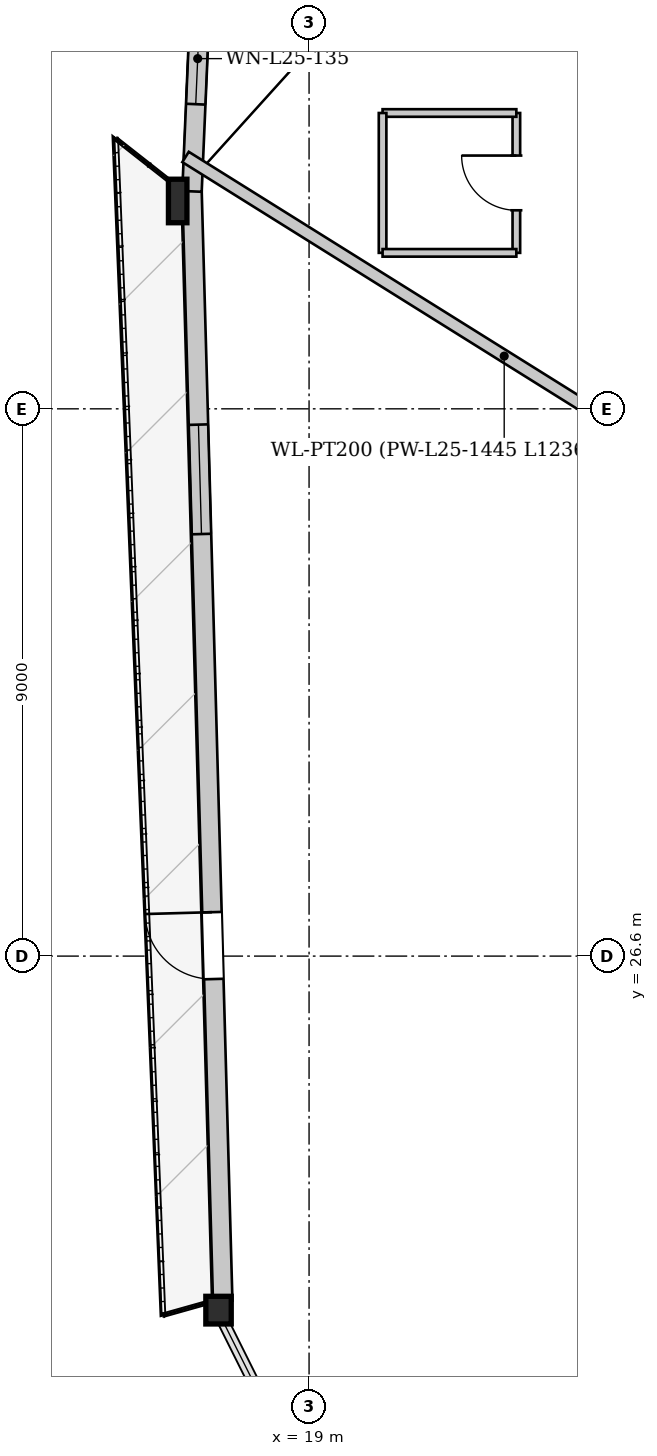
"""IFC4 building model, lengths in metres.
Left out: names, types, materials, properties, quantities, classifications, styles, units other than length and angle.
Written with IfcOpenShell. Run it as: python <this file> out.ifc"""

import sys

from ifc_helpers import new_model, si_unit, direction, frame, frame_2d, origin, origin_2d, place, context, subcontext, project, spatial, rectangle, i_section, extrude, source, transform, mapped, element, fill, save


model = new_model("IFC4")
c1 = context("Model", 3, precision=1e-05, world=origin(), true_north=direction((0.0, 1.0)))
c2 = subcontext(c1, "Body", "Model", "MODEL_VIEW")
j1 = project(units=[si_unit("LENGTHUNIT", "METRE"), si_unit("PLANEANGLEUNIT", "RADIAN")], contexts=[c1])
p1 = place(None, origin())
s1 = spatial("IfcSite", under=j1, at=p1, CompositionType="ELEMENT")
p2 = place(p1, origin())
s2 = spatial("IfcBuilding", under=s1, at=p2, CompositionType="ELEMENT")
p3 = place(p2, frame((0.0, 0.0, 98.6)))
s3 = spatial("IfcBuildingStorey", under=s2, at=p3, CompositionType="ELEMENT", Elevation=98.6)
m1 = source(origin(), c2, "Body", "SweptSolid", [
    extrude(i_section(OverallWidth=0.304, OverallDepth=0.716, WebThickness=0.021, FlangeThickness=0.04, at=origin_2d()), origin(), (0.0, 0.0, 1.0), 3.404),
])
p4 = place(p3, frame((16.914, 39.183, 0.0), z_axis=(-0.044103945942, -0.096956967339, 0.994310911354), x_axis=(0.910251157425, -0.414056554598, 0.0)))
e1 = element("IfcColumn", 1, at=p4, inside=s3, PredefinedType="COLUMN", context=c2, shape_type="MappedRepresentation", body=[
    mapped(m1, transform((0.0, 0.0, 0.0), x_axis=(1.0, 0.0, 0.0), y_axis=(0.0, 1.0, 0.0), z_axis=(0.0, 0.0, 1.0), scale=1.0)),
])
m2 = source(origin(), c2, "Body", "SweptSolid", [
    extrude(i_section(OverallWidth=0.418, OverallDepth=0.455, WebThickness=0.038, FlangeThickness=0.059, at=origin_2d()), origin(), (0.0, 0.0, 1.0), 3.403),
])
p5 = place(p3, frame((17.42, 20.926, 0.0), z_axis=(0.053593517987, -0.087241924863, 0.994744480445), x_axis=(0.852067057258, 0.52343264126, 0.0)))
e2 = element("IfcColumn", 2, at=p5, inside=s3, PredefinedType="COLUMN", context=c2, shape_type="MappedRepresentation", body=[
    mapped(m2, transform((0.0, 0.0, 0.0), x_axis=(1.0, 0.0, 0.0), y_axis=(0.0, 1.0, 0.0), z_axis=(0.0, 0.0, 1.0), scale=1.0)),
])
p6 = place(p3, frame((17.58, 20.931, 0.0), z_axis=(0.0, 0.0, 1.0), x_axis=(-0.027670598931, 0.99961709567, 0.0)))
e3 = element("IfcWall", 3, at=p6, inside=s3, PredefinedType="SOLIDWALL", context=c2, shape_type="SweptSolid", body=[
    extrude(rectangle(XDim=18.264, YDim=0.32, at=frame_2d((9.132, 0.0))), origin(), (0.0, 0.0, 1.0), 2.692),
])
p7 = place(p6, frame((5.294, 0.0, 0.0)))
e4 = element("IfcOpeningElement", 4, at=p7, cuts=e3, PredefinedType="OPENING", context=c2, shape_type="SweptSolid", body=[
    extrude(rectangle(XDim=1.1, YDim=2.3, at=frame_2d((0.55, 1.15))), frame((0.0, 0.17, 0.0), z_axis=(0.0, -1.0, 0.0), x_axis=(1.0, 0.0, 0.0)), (0.0, 0.0, 1.0), 0.34),
])
p8 = place(p6, frame((12.615, 0.0, 0.372)))
e5 = element("IfcOpeningElement", 5, at=p8, cuts=e3, PredefinedType="OPENING", context=c2, shape_type="SweptSolid", body=[
    extrude(rectangle(XDim=1.8, YDim=2.2, at=frame_2d((0.9, 1.1))), frame((0.0, 0.17, 0.0), z_axis=(0.0, -1.0, 0.0), x_axis=(1.0, 0.0, 0.0)), (0.0, 0.0, 1.0), 0.34),
])
p9 = place(p3, frame((17.074, 39.176, 0.0), z_axis=(0.0, 0.0, 1.0), x_axis=(0.043135301437, 0.999069239728, 0.0)))
e6 = element("IfcWall", 6, at=p9, inside=s3, PredefinedType="SOLIDWALL", context=c2, shape_type="SweptSolid", body=[
    extrude(rectangle(XDim=3.685, YDim=0.32, at=frame_2d((1.842, 0.0))), origin(), (0.0, 0.0, 1.0), 2.692),
])
p10 = place(p9, frame((1.435, 0.0, 0.272)))
e7 = element("IfcOpeningElement", 7, at=p10, cuts=e6, PredefinedType="OPENING", context=c2, shape_type="SweptSolid", body=[
    extrude(rectangle(XDim=1.5, YDim=2.3, at=frame_2d((0.75, 1.15))), frame((0.0, 0.17, 0.0), z_axis=(0.0, -1.0, 0.0), x_axis=(1.0, 0.0, 0.0)), (0.0, 0.0, 1.0), 0.34),
])
p11 = place(p3, frame((27.45, 33.192, 0.0), z_axis=(0.0, 0.0, 1.0), x_axis=(-0.848047128699, 0.529920812485, 0.0)))
e8 = element("IfcWall", 8, at=p11, inside=s3, PredefinedType="PARTITIONING", context=c2, shape_type="SweptSolid", body=[
    extrude(rectangle(XDim=12.36, YDim=0.2, at=frame_2d((6.18, 0.0))), origin(), (0.0, 0.0, 1.0), 3.3),
])
p12 = place(p3, frame((22.409, 38.165, 0.0), z_axis=(0.0, 0.0, 1.0), x_axis=(0.0, 1.0, 0.0)))
e9 = element("IfcWall", 9, at=p12, inside=s3, PredefinedType="PARTITIONING", context=c2, shape_type="SweptSolid", body=[
    extrude(rectangle(XDim=2.3, YDim=0.125, at=frame_2d((1.15, 0.0))), origin(), (0.0, 0.0, 1.0), 3.3),
])
p13 = place(p12, frame((0.7, 0.0, 0.0)))
e10 = element("IfcOpeningElement", 10, at=p13, cuts=e9, PredefinedType="OPENING", context=c2, shape_type="SweptSolid", body=[
    extrude(rectangle(XDim=0.9, YDim=2.1, at=frame_2d((0.45, 1.05))), frame((0.0, 0.073, 0.0), z_axis=(0.0, -1.0, 0.0), x_axis=(1.0, 0.0, 0.0)), (0.0, 0.0, 1.0), 0.145),
])
p14 = place(p3, frame((22.409, 40.465, 0.0), z_axis=(0.0, 0.0, 1.0), x_axis=(-1.0, 0.0, 0.0)))
e11 = element("IfcWall", 11, at=p14, inside=s3, PredefinedType="PARTITIONING", context=c2, shape_type="SweptSolid", body=[
    extrude(rectangle(XDim=2.2, YDim=0.125, at=frame_2d((1.1, 0.0))), origin(), (0.0, 0.0, 1.0), 3.3),
])
p15 = place(p3, frame((20.209, 40.465, 0.0), z_axis=(0.0, 0.0, 1.0), x_axis=(0.0, -1.0, 0.0)))
e12 = element("IfcWall", 12, at=p15, inside=s3, PredefinedType="PARTITIONING", context=c2, shape_type="SweptSolid", body=[
    extrude(rectangle(XDim=2.3, YDim=0.125, at=frame_2d((1.15, 0.0))), origin(), (0.0, 0.0, 1.0), 3.3),
])
p16 = place(p3, frame((20.209, 38.165, 0.0), z_axis=(0.0, 0.0, 1.0), x_axis=(1.0, 0.0, 0.0)))
e13 = element("IfcWall", 13, at=p16, inside=s3, PredefinedType="PARTITIONING", context=c2, shape_type="SweptSolid", body=[
    extrude(rectangle(XDim=2.2, YDim=0.125, at=frame_2d((1.1, 0.0))), origin(), (0.0, 0.0, 1.0), 3.3),
])
m3 = source(origin(), c2, "Body", "SweptSolid", [
    extrude(rectangle(XDim=1.1, YDim=2.3, at=frame_2d((0.55, 1.15))), frame((0.0, 0.025, 0.0), z_axis=(0.0, -1.0, 0.0), x_axis=(1.0, 0.0, 0.0)), (0.0, 0.0, 1.0), 0.05),
])
p17 = place(p7, origin())
e14 = element("IfcDoor", 14, at=p17, inside=s3, OperationType="SINGLE_SWING_RIGHT", PredefinedType="DOOR", context=c2, shape_type="MappedRepresentation", body=[
    mapped(m3, transform((0.0, 0.0, 0.0), x_axis=(1.0, 0.0, 0.0), y_axis=(0.0, 1.0, 0.0), z_axis=(0.0, 0.0, 1.0), scale=1.0)),
])
fill(e4, e14)
m4 = source(origin(), c2, "Body", "SweptSolid", [
    extrude(rectangle(XDim=1.8, YDim=2.2, at=frame_2d((0.9, 1.1))), frame((0.0, 0.03, 0.0), z_axis=(0.0, -1.0, 0.0), x_axis=(1.0, 0.0, 0.0)), (0.0, 0.0, 1.0), 0.06),
])
p18 = place(p8, origin())
e15 = element("IfcWindow", 15, at=p18, inside=s3, PartitioningType="SINGLE_PANEL", PredefinedType="WINDOW", context=c2, shape_type="MappedRepresentation", body=[
    mapped(m4, transform((0.0, 0.0, 0.0), x_axis=(1.0, 0.0, 0.0), y_axis=(0.0, 1.0, 0.0), z_axis=(0.0, 0.0, 1.0), scale=1.0)),
])
fill(e5, e15)
m5 = source(origin(), c2, "Body", "SweptSolid", [
    extrude(rectangle(XDim=1.5, YDim=2.3, at=frame_2d((0.75, 1.15))), frame((0.0, 0.03, 0.0), z_axis=(0.0, -1.0, 0.0), x_axis=(1.0, 0.0, 0.0)), (0.0, 0.0, 1.0), 0.06),
])
p19 = place(p10, origin())
e16 = element("IfcWindow", 16, at=p19, inside=s3, PartitioningType="SINGLE_PANEL", PredefinedType="WINDOW", context=c2, shape_type="MappedRepresentation", body=[
    mapped(m5, transform((0.0, 0.0, 0.0), x_axis=(1.0, 0.0, 0.0), y_axis=(0.0, 1.0, 0.0), z_axis=(0.0, 0.0, 1.0), scale=1.0)),
])
fill(e7, e16)
m6 = source(origin(), c2, "Body", "SweptSolid", [
    extrude(rectangle(XDim=0.9, YDim=2.1, at=frame_2d((0.45, 1.05))), frame((0.0, 0.025, 0.0), z_axis=(0.0, -1.0, 0.0), x_axis=(1.0, 0.0, 0.0)), (0.0, 0.0, 1.0), 0.05),
])
p20 = place(p13, origin())
e17 = element("IfcDoor", 17, at=p20, inside=s3, OperationType="SINGLE_SWING_RIGHT", PredefinedType="DOOR", context=c2, shape_type="MappedRepresentation", body=[
    mapped(m6, transform((0.0, 0.0, 0.0), x_axis=(1.0, 0.0, 0.0), y_axis=(0.0, 1.0, 0.0), z_axis=(0.0, 0.0, 1.0), scale=1.0)),
])
fill(e10, e17)
save(model, sys.argv[1])
